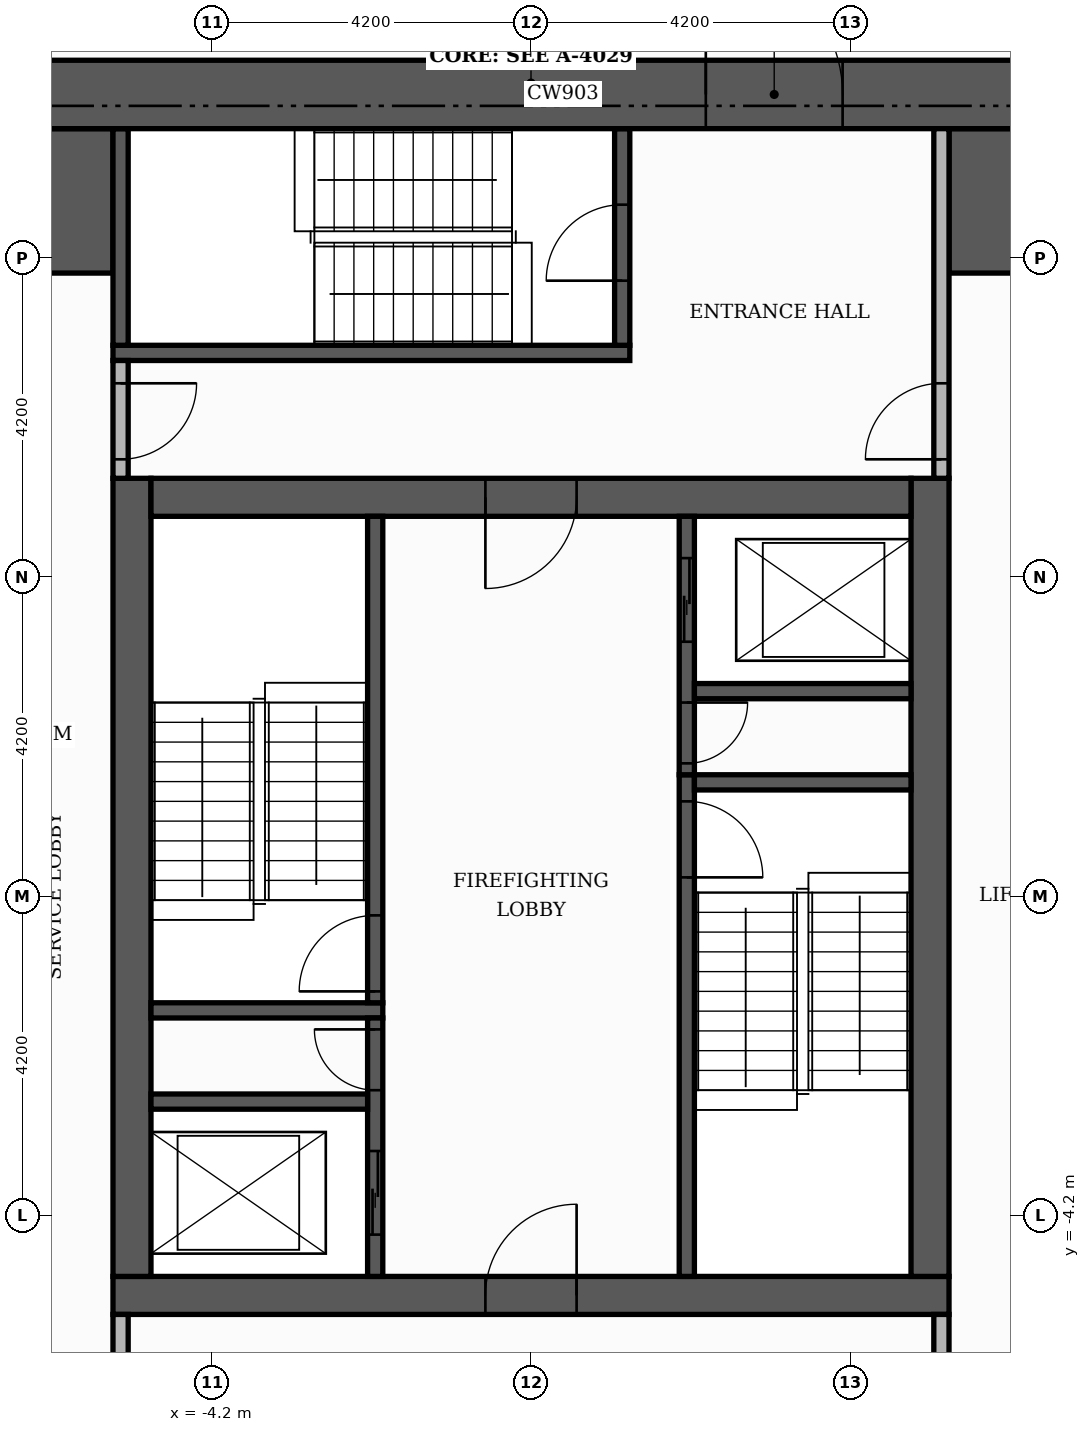
"""IFC4 building model, lengths in metres.
Left out: names, types, materials, properties, quantities, classifications, styles, units other than length and angle.
Written with IfcOpenShell. Run it as: python <this file> out.ifc"""

import sys

from ifc_helpers import new_model, si_unit, direction, frame, frame_2d, origin, place, context, subcontext, project, spatial, rectangle, extrude, element, fill, save


model = new_model("IFC4")
c1 = context("Model", 3, precision=1e-05, world=origin(), true_north=direction((0.0, 1.0)))
c2 = subcontext(c1, "Body", "Model", "MODEL_VIEW")
j1 = project(units=[si_unit("LENGTHUNIT", "METRE"), si_unit("PLANEANGLEUNIT", "RADIAN")], contexts=[c1])
p1 = place(None, origin())
s1 = spatial("IfcSite", under=j1, at=p1, CompositionType="ELEMENT")
p2 = place(p1, origin())
s2 = spatial("IfcBuilding", under=s1, at=p2, CompositionType="ELEMENT")
p3 = place(p2, frame((0.0, 0.0, 172.8)))
s3 = spatial("IfcBuildingStorey", under=s2, at=p3, CompositionType="ELEMENT", Elevation=172.8)
p4 = place(p3, frame((-5.5, -5.25, 0.0), z_axis=(0.0, 0.0, 1.0), x_axis=(1.0, 0.0, 0.0)))
e1 = element("IfcWall", 1, at=p4, inside=s3, PredefinedType="SHEAR", context=c2, shape_type="SweptSolid", body=[
    extrude(rectangle(XDim=11.0, YDim=0.5, at=frame_2d((5.5, 0.0))), origin(), (0.0, 0.0, 1.0), 3.48),
])
p5 = place(p4, frame((4.9, 0.0, 0.0)))
e2 = element("IfcOpeningElement", 2, at=p5, cuts=e1, PredefinedType="OPENING", context=c2, shape_type="SweptSolid", body=[
    extrude(rectangle(XDim=1.2, YDim=2.1, at=frame_2d((0.6, 1.05))), frame((0.0, 0.26, 0.0), z_axis=(0.0, -1.0, 0.0), x_axis=(1.0, 0.0, 0.0)), (0.0, 0.0, 1.0), 0.52),
])
for number, where, z_axis, x_axis in (
    (3, (-5.25, -5.0, 0.0), (0.0, 0.0, 1.0), (0.0, 1.0, 0.0)),
    (4, (5.25, -5.0, 0.0), (0.0, 0.0, 1.0), (0.0, 1.0, 0.0)),
):
    element("IfcWall", number, at=place(p3, frame(where, z_axis=z_axis, x_axis=x_axis)), inside=s3, PredefinedType="SHEAR", context=c2, shape_type="SweptSolid", body=[
        extrude(rectangle(XDim=10.5, YDim=0.5, at=frame_2d((5.25, 0.0))), origin(), (0.0, 0.0, 1.0), 3.48),
    ])
p6 = place(p3, frame((-5.0, 5.25, 0.0), z_axis=(0.0, 0.0, 1.0), x_axis=(1.0, 0.0, 0.0)))
e5 = element("IfcWall", 5, at=p6, inside=s3, PredefinedType="SHEAR", context=c2, shape_type="SweptSolid", body=[
    extrude(rectangle(XDim=10.0, YDim=0.5, at=frame_2d((5.0, 0.0))), origin(), (0.0, 0.0, 1.0), 3.48),
])
p7 = place(p6, frame((4.4, 0.0, 0.0)))
e6 = element("IfcOpeningElement", 6, at=p7, cuts=e5, PredefinedType="OPENING", context=c2, shape_type="SweptSolid", body=[
    extrude(rectangle(XDim=1.2, YDim=2.1, at=frame_2d((0.6, 1.05))), frame((0.0, 0.26, 0.0), z_axis=(0.0, -1.0, 0.0), x_axis=(1.0, 0.0, 0.0)), (0.0, 0.0, 1.0), 0.52),
])
for number, where, z_axis, x_axis in (
    (7, (-10.1, 9.15, 0.0), (0.0, 0.0, 1.0), (1.0, 0.0, 0.0)),
    (8, (5.5, 9.15, 0.0), (0.0, 0.0, 1.0), (1.0, 0.0, 0.0)),
):
    element("IfcWall", number, at=place(p3, frame(where, z_axis=z_axis, x_axis=x_axis)), inside=s3, PredefinedType="SHEAR", context=c2, shape_type="SweptSolid", body=[
        extrude(rectangle(XDim=4.6, YDim=1.9, at=frame_2d((2.3, 0.0))), origin(), (0.0, 0.0, 1.0), 3.48),
    ])
p8 = place(p3, frame((2.05, -5.0, 0.0), z_axis=(0.0, 0.0, 1.0), x_axis=(0.0, 1.0, 0.0)))
e9 = element("IfcWall", 9, at=p8, inside=s3, PredefinedType="SHEAR", context=c2, shape_type="SweptSolid", body=[
    extrude(rectangle(XDim=6.6, YDim=0.2, at=frame_2d((3.3, 0.0))), origin(), (0.0, 0.0, 1.0), 3.48),
])
p9 = place(p8, frame((5.25, 0.0, 0.0)))
e10 = element("IfcOpeningElement", 10, at=p9, cuts=e9, PredefinedType="OPENING", context=c2, shape_type="SweptSolid", body=[
    extrude(rectangle(XDim=1.0, YDim=2.1, at=frame_2d((0.5, 1.05))), frame((0.0, 0.11, 0.0), z_axis=(0.0, -1.0, 0.0), x_axis=(1.0, 0.0, 0.0)), (0.0, 0.0, 1.0), 0.22),
])
p10 = place(p3, frame((-5.0, -1.5, 0.0), z_axis=(0.0, 0.0, 1.0), x_axis=(1.0, 0.0, 0.0)))
e11 = element("IfcWall", 11, at=p10, inside=s3, PredefinedType="SHEAR", context=c2, shape_type="SweptSolid", body=[
    extrude(rectangle(XDim=3.05, YDim=0.2, at=frame_2d((1.525, 0.0))), origin(), (0.0, 0.0, 1.0), 3.48),
])
p11 = place(p3, frame((-2.05, -1.4, 0.0), z_axis=(0.0, 0.0, 1.0), x_axis=(0.0, 1.0, 0.0)))
e12 = element("IfcWall", 12, at=p11, inside=s3, PredefinedType="SHEAR", context=c2, shape_type="SweptSolid", body=[
    extrude(rectangle(XDim=6.4, YDim=0.2, at=frame_2d((3.2, 0.0))), origin(), (0.0, 0.0, 1.0), 3.48),
])
p12 = place(p11, frame((0.15, 0.0, 0.0)))
e13 = element("IfcOpeningElement", 13, at=p12, cuts=e12, PredefinedType="OPENING", context=c2, shape_type="SweptSolid", body=[
    extrude(rectangle(XDim=1.0, YDim=2.1, at=frame_2d((0.5, 1.05))), frame((0.0, 0.11, 0.0), z_axis=(0.0, -1.0, 0.0), x_axis=(1.0, 0.0, 0.0)), (0.0, 0.0, 1.0), 0.22),
])
p13 = place(p3, frame((2.15, 1.5, 0.0), z_axis=(0.0, 0.0, 1.0), x_axis=(1.0, 0.0, 0.0)))
e14 = element("IfcWall", 14, at=p13, inside=s3, PredefinedType="SHEAR", context=c2, shape_type="SweptSolid", body=[
    extrude(rectangle(XDim=2.85, YDim=0.2, at=frame_2d((1.425, 0.0))), origin(), (0.0, 0.0, 1.0), 3.48),
])
p14 = place(p3, frame((-5.5, 7.15, 0.0), z_axis=(0.0, 0.0, 1.0), x_axis=(1.0, 0.0, 0.0)))
e15 = element("IfcWall", 15, at=p14, inside=s3, PredefinedType="SHEAR", context=c2, shape_type="SweptSolid", body=[
    extrude(rectangle(XDim=6.8, YDim=0.2, at=frame_2d((3.4, 0.0))), origin(), (0.0, 0.0, 1.0), 3.48),
])
p15 = place(p3, frame((-5.4, 7.25, 0.0), z_axis=(0.0, 0.0, 1.0), x_axis=(0.0, 1.0, 0.0)))
e16 = element("IfcWall", 16, at=p15, inside=s3, PredefinedType="SHEAR", context=c2, shape_type="SweptSolid", body=[
    extrude(rectangle(XDim=2.85, YDim=0.2, at=frame_2d((1.425, 0.0))), origin(), (0.0, 0.0, 1.0), 3.48),
])
p16 = place(p3, frame((1.2, 7.25, 0.0), z_axis=(0.0, 0.0, 1.0), x_axis=(0.0, 1.0, 0.0)))
e17 = element("IfcWall", 17, at=p16, inside=s3, PredefinedType="SHEAR", context=c2, shape_type="SweptSolid", body=[
    extrude(rectangle(XDim=2.85, YDim=0.2, at=frame_2d((1.425, 0.0))), origin(), (0.0, 0.0, 1.0), 3.48),
])
p17 = place(p16, frame((0.85, 0.0, 0.0)))
e18 = element("IfcOpeningElement", 18, at=p17, cuts=e17, PredefinedType="OPENING", context=c2, shape_type="SweptSolid", body=[
    extrude(rectangle(XDim=1.0, YDim=2.1, at=frame_2d((0.5, 1.05))), frame((0.0, 0.11, 0.0), z_axis=(0.0, -1.0, 0.0), x_axis=(1.0, 0.0, 0.0)), (0.0, 0.0, 1.0), 0.22),
])
p18 = place(p3, frame((-2.05, -5.0, 0.0), z_axis=(0.0, 0.0, 1.0), x_axis=(0.0, 1.0, 0.0)))
e19 = element("IfcWall", 19, at=p18, inside=s3, PredefinedType="SHEAR", context=c2, shape_type="SweptSolid", body=[
    extrude(rectangle(XDim=3.4, YDim=0.2, at=frame_2d((1.7, 0.0))), origin(), (0.0, 0.0, 1.0), 3.48),
])
p19 = place(p18, frame((0.55, 0.0, 0.0)))
e20 = element("IfcOpeningElement", 20, at=p19, cuts=e19, PredefinedType="OPENING", context=c2, shape_type="SweptSolid", body=[
    extrude(rectangle(XDim=1.1, YDim=2.1, at=frame_2d((0.55, 1.05))), frame((0.0, 0.11, 0.0), z_axis=(0.0, -1.0, 0.0), x_axis=(1.0, 0.0, 0.0)), (0.0, 0.0, 1.0), 0.22),
])
p20 = place(p18, frame((2.45, 0.0, 0.0)))
e21 = element("IfcOpeningElement", 21, at=p20, cuts=e19, PredefinedType="OPENING", context=c2, shape_type="SweptSolid", body=[
    extrude(rectangle(XDim=0.8, YDim=2.1, at=frame_2d((0.4, 1.05))), frame((0.0, 0.11, 0.0), z_axis=(0.0, -1.0, 0.0), x_axis=(1.0, 0.0, 0.0)), (0.0, 0.0, 1.0), 0.22),
])
p21 = place(p3, frame((-5.0, -2.7, 0.0), z_axis=(0.0, 0.0, 1.0), x_axis=(1.0, 0.0, 0.0)))
e22 = element("IfcWall", 22, at=p21, inside=s3, PredefinedType="SHEAR", context=c2, shape_type="SweptSolid", body=[
    extrude(rectangle(XDim=2.85, YDim=0.2, at=frame_2d((1.425, 0.0))), origin(), (0.0, 0.0, 1.0), 3.48),
])
p22 = place(p3, frame((2.05, 1.6, 0.0), z_axis=(0.0, 0.0, 1.0), x_axis=(0.0, 1.0, 0.0)))
e23 = element("IfcWall", 23, at=p22, inside=s3, PredefinedType="SHEAR", context=c2, shape_type="SweptSolid", body=[
    extrude(rectangle(XDim=3.4, YDim=0.2, at=frame_2d((1.7, 0.0))), origin(), (0.0, 0.0, 1.0), 3.48),
])
p23 = place(p22, frame((1.75, 0.0, 0.0)))
e24 = element("IfcOpeningElement", 24, at=p23, cuts=e23, PredefinedType="OPENING", context=c2, shape_type="SweptSolid", body=[
    extrude(rectangle(XDim=1.1, YDim=2.1, at=frame_2d((0.55, 1.05))), frame((0.0, 0.11, 0.0), z_axis=(0.0, -1.0, 0.0), x_axis=(1.0, 0.0, 0.0)), (0.0, 0.0, 1.0), 0.22),
])
p24 = place(p22, frame((0.15, 0.0, 0.0)))
e25 = element("IfcOpeningElement", 25, at=p24, cuts=e23, PredefinedType="OPENING", context=c2, shape_type="SweptSolid", body=[
    extrude(rectangle(XDim=0.8, YDim=2.1, at=frame_2d((0.4, 1.05))), frame((0.0, 0.11, 0.0), z_axis=(0.0, -1.0, 0.0), x_axis=(1.0, 0.0, 0.0)), (0.0, 0.0, 1.0), 0.22),
])
p25 = place(p3, frame((2.15, 2.7, 0.0), z_axis=(0.0, 0.0, 1.0), x_axis=(1.0, 0.0, 0.0)))
e26 = element("IfcWall", 26, at=p25, inside=s3, PredefinedType="SHEAR", context=c2, shape_type="SweptSolid", body=[
    extrude(rectangle(XDim=2.85, YDim=0.2, at=frame_2d((1.425, 0.0))), origin(), (0.0, 0.0, 1.0), 3.48),
])
p26 = place(p3, frame((-11.0, 10.55, 0.0), z_axis=(0.0, 0.0, 1.0), x_axis=(1.0, 0.0, 0.0)))
e27 = element("IfcWall", 27, at=p26, inside=s3, PredefinedType="SHEAR", context=c2, shape_type="SweptSolid", body=[
    extrude(rectangle(XDim=22.0, YDim=0.9, at=frame_2d((11.0, 0.0))), origin(), (0.0, 0.0, 1.0), 3.48),
])
p27 = place(p26, frame((13.3, 0.0, 0.0)))
e28 = element("IfcOpeningElement", 28, at=p27, cuts=e27, PredefinedType="OPENING", context=c2, shape_type="SweptSolid", body=[
    extrude(rectangle(XDim=1.8, YDim=2.2, at=frame_2d((0.9, 1.1))), frame((0.0, 0.46, 0.0), z_axis=(0.0, -1.0, 0.0), x_axis=(1.0, 0.0, 0.0)), (0.0, 0.0, 1.0), 0.92),
])
p28 = place(p3, frame((-5.4, -10.1, 0.0), z_axis=(0.0, 0.0, 1.0), x_axis=(0.0, 1.0, 0.0)))
e29 = element("IfcWall", 29, at=p28, inside=s3, PredefinedType="PARTITIONING", context=c2, shape_type="SweptSolid", body=[
    extrude(rectangle(XDim=4.6, YDim=0.2, at=frame_2d((2.3, 0.0))), origin(), (0.0, 0.0, 1.0), 3.48),
])
p29 = place(p28, frame((2.9, 0.0, 0.0)))
e30 = element("IfcOpeningElement", 30, at=p29, cuts=e29, PredefinedType="OPENING", context=c2, shape_type="SweptSolid", body=[
    extrude(rectangle(XDim=1.0, YDim=2.1, at=frame_2d((0.5, 1.05))), frame((0.0, 0.11, 0.0), z_axis=(0.0, -1.0, 0.0), x_axis=(1.0, 0.0, 0.0)), (0.0, 0.0, 1.0), 0.22),
])
p30 = place(p3, frame((5.4, -10.1, 0.0), z_axis=(0.0, 0.0, 1.0), x_axis=(0.0, 1.0, 0.0)))
e31 = element("IfcWall", 31, at=p30, inside=s3, PredefinedType="PARTITIONING", context=c2, shape_type="SweptSolid", body=[
    extrude(rectangle(XDim=4.6, YDim=0.2, at=frame_2d((2.3, 0.0))), origin(), (0.0, 0.0, 1.0), 3.48),
])
p31 = place(p30, frame((2.9, 0.0, 0.0)))
e32 = element("IfcOpeningElement", 32, at=p31, cuts=e31, PredefinedType="OPENING", context=c2, shape_type="SweptSolid", body=[
    extrude(rectangle(XDim=1.0, YDim=2.1, at=frame_2d((0.5, 1.05))), frame((0.0, 0.11, 0.0), z_axis=(0.0, -1.0, 0.0), x_axis=(1.0, 0.0, 0.0)), (0.0, 0.0, 1.0), 0.22),
])
p32 = place(p3, frame((-5.4, 5.5, 0.0), z_axis=(0.0, 0.0, 1.0), x_axis=(0.0, 1.0, 0.0)))
e33 = element("IfcWall", 33, at=p32, inside=s3, PredefinedType="PARTITIONING", context=c2, shape_type="SweptSolid", body=[
    extrude(rectangle(XDim=1.55, YDim=0.2, at=frame_2d((0.775, 0.0))), origin(), (0.0, 0.0, 1.0), 3.48),
])
p33 = place(p32, frame((0.25, 0.0, 0.0)))
e34 = element("IfcOpeningElement", 34, at=p33, cuts=e33, PredefinedType="OPENING", context=c2, shape_type="SweptSolid", body=[
    extrude(rectangle(XDim=1.0, YDim=2.1, at=frame_2d((0.5, 1.05))), frame((0.0, 0.11, 0.0), z_axis=(0.0, -1.0, 0.0), x_axis=(1.0, 0.0, 0.0)), (0.0, 0.0, 1.0), 0.22),
])
p34 = place(p3, frame((5.4, 5.5, 0.0), z_axis=(0.0, 0.0, 1.0), x_axis=(0.0, 1.0, 0.0)))
e35 = element("IfcWall", 35, at=p34, inside=s3, PredefinedType="PARTITIONING", context=c2, shape_type="SweptSolid", body=[
    extrude(rectangle(XDim=4.6, YDim=0.2, at=frame_2d((2.3, 0.0))), origin(), (0.0, 0.0, 1.0), 3.48),
])
p35 = place(p34, frame((0.25, 0.0, 0.0)))
e36 = element("IfcOpeningElement", 36, at=p35, cuts=e35, PredefinedType="OPENING", context=c2, shape_type="SweptSolid", body=[
    extrude(rectangle(XDim=1.0, YDim=2.1, at=frame_2d((0.5, 1.05))), frame((0.0, 0.11, 0.0), z_axis=(0.0, -1.0, 0.0), x_axis=(1.0, 0.0, 0.0)), (0.0, 0.0, 1.0), 0.22),
])
p36 = place(p23, origin())
e37 = element("IfcDoor", 37, at=p36, inside=s3, OperationType="SLIDING_TO_LEFT", PredefinedType="DOOR", context=c2, shape_type="SweptSolid", body=[
    extrude(rectangle(XDim=1.1, YDim=2.1, at=frame_2d((0.55, 1.05))), frame((0.0, 0.025, 0.0), z_axis=(0.0, -1.0, 0.0), x_axis=(1.0, 0.0, 0.0)), (0.0, 0.0, 1.0), 0.05),
])
fill(e24, e37)
p37 = place(p19, origin())
e38 = element("IfcDoor", 38, at=p37, inside=s3, OperationType="SLIDING_TO_LEFT", PredefinedType="DOOR", context=c2, shape_type="SweptSolid", body=[
    extrude(rectangle(XDim=1.1, YDim=2.1, at=frame_2d((0.55, 1.05))), frame((0.0, 0.025, 0.0), z_axis=(0.0, -1.0, 0.0), x_axis=(1.0, 0.0, 0.0)), (0.0, 0.0, 1.0), 0.05),
])
fill(e20, e38)
p38 = place(p12, origin())
e39 = element("IfcDoor", 39, at=p38, inside=s3, OperationType="SINGLE_SWING_LEFT", PredefinedType="DOOR", context=c2, shape_type="SweptSolid", body=[
    extrude(rectangle(XDim=1.0, YDim=2.1, at=frame_2d((0.5, 1.05))), frame((0.0, 0.025, 0.0), z_axis=(0.0, -1.0, 0.0), x_axis=(1.0, 0.0, 0.0)), (0.0, 0.0, 1.0), 0.05),
])
fill(e13, e39)
p39 = place(p9, frame((1.0, 0.0, 0.0), z_axis=(0.0, 0.0, 1.0), x_axis=(-1.0, 0.0, 0.0)))
e40 = element("IfcDoor", 40, at=p39, inside=s3, OperationType="SINGLE_SWING_LEFT", PredefinedType="DOOR", context=c2, shape_type="SweptSolid", body=[
    extrude(rectangle(XDim=1.0, YDim=2.1, at=frame_2d((0.5, 1.05))), frame((0.0, 0.025, 0.0), z_axis=(0.0, -1.0, 0.0), x_axis=(1.0, 0.0, 0.0)), (0.0, 0.0, 1.0), 0.05),
])
fill(e10, e40)
p40 = place(p24, frame((0.8, 0.0, 0.0), z_axis=(0.0, 0.0, 1.0), x_axis=(-1.0, 0.0, 0.0)))
e41 = element("IfcDoor", 41, at=p40, inside=s3, OperationType="SINGLE_SWING_RIGHT", PredefinedType="DOOR", context=c2, shape_type="SweptSolid", body=[
    extrude(rectangle(XDim=0.8, YDim=2.1, at=frame_2d((0.4, 1.05))), frame((0.0, 0.025, 0.0), z_axis=(0.0, -1.0, 0.0), x_axis=(1.0, 0.0, 0.0)), (0.0, 0.0, 1.0), 0.05),
])
fill(e25, e41)
p41 = place(p20, origin())
e42 = element("IfcDoor", 42, at=p41, inside=s3, OperationType="SINGLE_SWING_RIGHT", PredefinedType="DOOR", context=c2, shape_type="SweptSolid", body=[
    extrude(rectangle(XDim=0.8, YDim=2.1, at=frame_2d((0.4, 1.05))), frame((0.0, 0.025, 0.0), z_axis=(0.0, -1.0, 0.0), x_axis=(1.0, 0.0, 0.0)), (0.0, 0.0, 1.0), 0.05),
])
fill(e21, e42)
p42 = place(p7, frame((1.2, 0.0, 0.0), z_axis=(0.0, 0.0, 1.0), x_axis=(-1.0, 0.0, 0.0)))
e43 = element("IfcDoor", 43, at=p42, inside=s3, OperationType="SINGLE_SWING_LEFT", PredefinedType="DOOR", context=c2, shape_type="SweptSolid", body=[
    extrude(rectangle(XDim=1.2, YDim=2.1, at=frame_2d((0.6, 1.05))), frame((0.0, 0.025, 0.0), z_axis=(0.0, -1.0, 0.0), x_axis=(1.0, 0.0, 0.0)), (0.0, 0.0, 1.0), 0.05),
])
fill(e6, e43)
p43 = place(p5, origin())
e44 = element("IfcDoor", 44, at=p43, inside=s3, OperationType="SINGLE_SWING_RIGHT", PredefinedType="DOOR", context=c2, shape_type="SweptSolid", body=[
    extrude(rectangle(XDim=1.2, YDim=2.1, at=frame_2d((0.6, 1.05))), frame((0.0, 0.025, 0.0), z_axis=(0.0, -1.0, 0.0), x_axis=(1.0, 0.0, 0.0)), (0.0, 0.0, 1.0), 0.05),
])
fill(e2, e44)
p44 = place(p17, origin())
e45 = element("IfcDoor", 45, at=p44, inside=s3, OperationType="SINGLE_SWING_LEFT", PredefinedType="DOOR", context=c2, shape_type="SweptSolid", body=[
    extrude(rectangle(XDim=1.0, YDim=2.1, at=frame_2d((0.5, 1.05))), frame((0.0, 0.025, 0.0), z_axis=(0.0, -1.0, 0.0), x_axis=(1.0, 0.0, 0.0)), (0.0, 0.0, 1.0), 0.05),
])
fill(e18, e45)
p45 = place(p33, frame((1.0, 0.0, 0.0), z_axis=(0.0, 0.0, 1.0), x_axis=(-1.0, 0.0, 0.0)))
e46 = element("IfcDoor", 46, at=p45, inside=s3, OperationType="SINGLE_SWING_RIGHT", PredefinedType="DOOR", context=c2, shape_type="SweptSolid", body=[
    extrude(rectangle(XDim=1.0, YDim=2.1, at=frame_2d((0.5, 1.05))), frame((0.0, 0.025, 0.0), z_axis=(0.0, -1.0, 0.0), x_axis=(1.0, 0.0, 0.0)), (0.0, 0.0, 1.0), 0.05),
])
fill(e34, e46)
p46 = place(p35, origin())
e47 = element("IfcDoor", 47, at=p46, inside=s3, OperationType="SINGLE_SWING_LEFT", PredefinedType="DOOR", context=c2, shape_type="SweptSolid", body=[
    extrude(rectangle(XDim=1.0, YDim=2.1, at=frame_2d((0.5, 1.05))), frame((0.0, 0.025, 0.0), z_axis=(0.0, -1.0, 0.0), x_axis=(1.0, 0.0, 0.0)), (0.0, 0.0, 1.0), 0.05),
])
fill(e36, e47)
p47 = place(p27, origin())
e48 = element("IfcDoor", 48, at=p47, inside=s3, OperationType="DOUBLE_DOOR_SINGLE_SWING", PredefinedType="DOOR", context=c2, shape_type="SweptSolid", body=[
    extrude(rectangle(XDim=1.8, YDim=2.2, at=frame_2d((0.9, 1.1))), frame((0.0, 0.025, 0.0), z_axis=(0.0, -1.0, 0.0), x_axis=(1.0, 0.0, 0.0)), (0.0, 0.0, 1.0), 0.05),
])
fill(e28, e48)
save(model, sys.argv[1])
